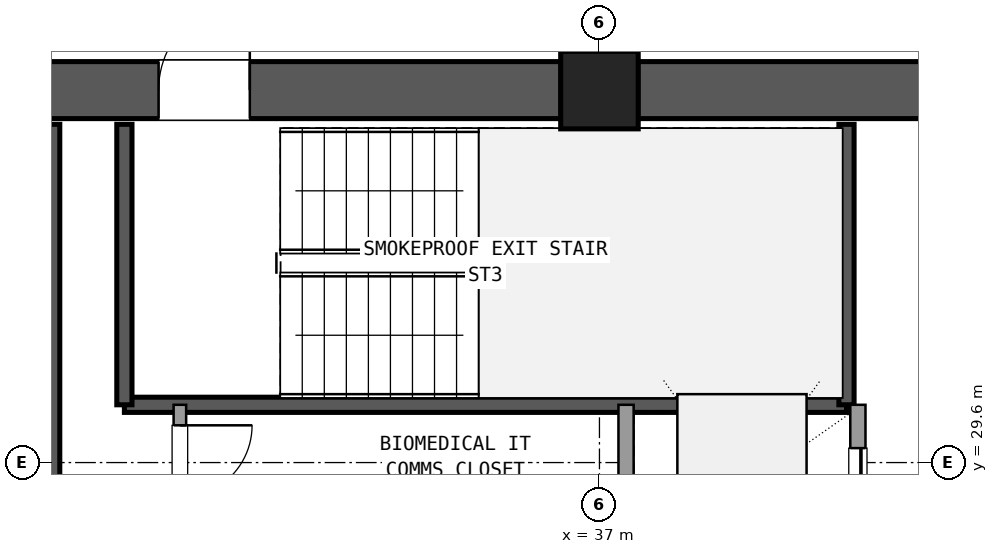
"""IFC4 building model, lengths in metres.
Left out: names, types, materials, properties, quantities, classifications, styles, units other than length and angle.
Written with IfcOpenShell. Run it as: python <this file> out.ifc"""

import sys

from ifc_helpers import new_model, si_unit, direction, frame, frame_2d, origin, origin_2d, place, context, subcontext, project, spatial, rectangle, extrude, element, fill, save


model = new_model("IFC4")
c1 = context("Model", 3, precision=1e-05, world=origin(), true_north=direction((0.0, 1.0)))
c2 = subcontext(c1, "Body", "Model", "MODEL_VIEW")
j1 = project(units=[si_unit("LENGTHUNIT", "METRE"), si_unit("PLANEANGLEUNIT", "RADIAN")], contexts=[c1])
p1 = place(None, origin())
s1 = spatial("IfcSite", under=j1, at=p1, CompositionType="ELEMENT")
p2 = place(p1, origin())
s2 = spatial("IfcBuilding", under=s1, at=p2, CompositionType="ELEMENT")
p3 = place(p2, frame((0.0, 0.0, 170.82)))
s3 = spatial("IfcBuildingStorey", under=s2, at=p3, CompositionType="ELEMENT", Elevation=170.82)
p4 = place(p3, frame((37.0, 34.5, 0.0), z_axis=(0.0, 0.0, 1.0), x_axis=(1.0, 0.0, 0.0)))
e1 = element("IfcColumn", 1, at=p4, inside=s3, PredefinedType="COLUMN", context=c2, shape_type="SweptSolid", body=[
    extrude(rectangle(XDim=1.02, YDim=1.02, at=origin_2d()), origin(), (0.0, 0.0, 1.0), 3.6),
])
p5 = place(p3, frame((47.695, 34.5, 0.0), z_axis=(0.0, 0.0, 1.0), x_axis=(-1.0, 0.0, 0.0)))
e2 = element("IfcWall", 2, at=p5, inside=s3, PredefinedType="SHEAR", context=c2, shape_type="SweptSolid", body=[
    extrude(rectangle(XDim=10.19, YDim=0.75, at=frame_2d((5.095, 0.0))), origin(), (0.0, 0.0, 1.0), 3.32),
])
p6 = place(p5, frame((4.595, 0.0, 0.0)))
e3 = element("IfcOpeningElement", 3, at=p6, cuts=e2, PredefinedType="OPENING", context=c2, shape_type="SweptSolid", body=[
    extrude(rectangle(XDim=1.6, YDim=2.2, at=frame_2d((0.8, 1.1))), frame((0.0, 0.385, 0.0), z_axis=(0.0, -1.0, 0.0), x_axis=(1.0, 0.0, 0.0)), (0.0, 0.0, 1.0), 0.77),
])
p7 = place(p3, frame((36.495, 34.5, 0.0), z_axis=(0.0, 0.0, 1.0), x_axis=(-1.0, 0.0, 0.0)))
e4 = element("IfcWall", 4, at=p7, inside=s3, PredefinedType="SHEAR", context=c2, shape_type="SweptSolid", body=[
    extrude(rectangle(XDim=10.19, YDim=0.75, at=frame_2d((5.095, 0.0))), origin(), (0.0, 0.0, 1.0), 3.32),
])
p8 = place(p7, frame((4.095, 0.0, 0.0)))
e5 = element("IfcOpeningElement", 5, at=p8, cuts=e4, PredefinedType="OPENING", context=c2, shape_type="SweptSolid", body=[
    extrude(rectangle(XDim=1.2, YDim=2.15, at=frame_2d((0.6, 1.075))), frame((0.0, 0.385, 0.0), z_axis=(0.0, -1.0, 0.0), x_axis=(1.0, 0.0, 0.0)), (0.0, 0.0, 1.0), 0.77),
])
p9 = place(p3, frame((29.8, 24.65, 0.0), z_axis=(0.0, 0.0, 1.0), x_axis=(0.0, 1.0, 0.0)))
e6 = element("IfcWall", 6, at=p9, inside=s3, PredefinedType="SHEAR", context=c2, shape_type="SweptSolid", body=[
    extrude(rectangle(XDim=9.4, YDim=0.2, at=frame_2d((4.7, 0.0))), origin(), (0.0, 0.0, 1.0), 3.32),
])
p10 = place(p3, frame((30.75, 30.36, 0.0), z_axis=(0.0, 0.0, 1.0), x_axis=(1.0, 0.0, 0.0)))
e7 = element("IfcWall", 7, at=p10, inside=s3, PredefinedType="SHEAR", context=c2, shape_type="SweptSolid", body=[
    extrude(rectangle(XDim=9.5, YDim=0.2, at=frame_2d((4.75, 0.0))), origin(), (0.0, 0.0, 1.0), 3.32),
])
for number, where, z_axis, x_axis in (
    (8, (30.75, 30.36, 0.0), (0.0, 0.0, 1.0), (0.0, 1.0, 0.0)),
    (9, (40.25, 30.36, 0.0), (0.0, 0.0, 1.0), (0.0, 1.0, 0.0)),
):
    element("IfcWall", number, at=place(p3, frame(where, z_axis=z_axis, x_axis=x_axis)), inside=s3, PredefinedType="SHEAR", context=c2, shape_type="SweptSolid", body=[
        extrude(rectangle(XDim=3.69, YDim=0.2, at=frame_2d((1.845, 0.0))), origin(), (0.0, 0.0, 1.0), 3.32),
    ])
p11 = place(p3, frame((37.35, 23.54, 0.0), z_axis=(0.0, 0.0, 1.0), x_axis=(0.0, 1.0, 0.0)))
e10 = element("IfcWall", 10, at=p11, inside=s3, PredefinedType="SOLIDWALL", context=c2, shape_type="SweptSolid", body=[
    extrude(rectangle(XDim=6.82, YDim=0.2, at=frame_2d((3.41, 0.0))), origin(), (0.0, 0.0, 1.0), 2.61),
])
p12 = place(p3, frame((40.4, 23.54, 0.0), z_axis=(0.0, 0.0, 1.0), x_axis=(0.0, 1.0, 0.0)))
e11 = element("IfcWall", 11, at=p12, inside=s3, PredefinedType="SOLIDWALL", context=c2, shape_type="SweptSolid", body=[
    extrude(rectangle(XDim=6.82, YDim=0.2, at=frame_2d((3.41, 0.0))), origin(), (0.0, 0.0, 1.0), 2.61),
])
p13 = place(p12, frame((0.35, 0.0, 0.0)))
e12 = element("IfcOpeningElement", 12, at=p13, cuts=e11, PredefinedType="OPENING", context=c2, shape_type="SweptSolid", body=[
    extrude(rectangle(XDim=1.4, YDim=2.2, at=frame_2d((0.7, 1.1))), frame((0.0, 0.11, 0.0), z_axis=(0.0, -1.0, 0.0), x_axis=(1.0, 0.0, 0.0)), (0.0, 0.0, 1.0), 0.22),
])
p14 = place(p12, frame((2.65, 0.0, 0.0)))
e13 = element("IfcOpeningElement", 13, at=p14, cuts=e11, PredefinedType="OPENING", context=c2, shape_type="SweptSolid", body=[
    extrude(rectangle(XDim=1.4, YDim=2.2, at=frame_2d((0.7, 1.1))), frame((0.0, 0.11, 0.0), z_axis=(0.0, -1.0, 0.0), x_axis=(1.0, 0.0, 0.0)), (0.0, 0.0, 1.0), 0.22),
])
p15 = place(p12, frame((4.85, 0.0, 0.0)))
e14 = element("IfcOpeningElement", 14, at=p15, cuts=e11, PredefinedType="OPENING", context=c2, shape_type="SweptSolid", body=[
    extrude(rectangle(XDim=1.4, YDim=2.2, at=frame_2d((0.7, 1.1))), frame((0.0, 0.11, 0.0), z_axis=(0.0, -1.0, 0.0), x_axis=(1.0, 0.0, 0.0)), (0.0, 0.0, 1.0), 0.22),
])
p16 = place(p3, frame((31.48, 26.32, 0.0), z_axis=(0.0, 0.0, 1.0), x_axis=(0.0, 1.0, 0.0)))
e15 = element("IfcWall", 15, at=p16, inside=s3, PredefinedType="PLUMBINGWALL", context=c2, shape_type="SweptSolid", body=[
    extrude(rectangle(XDim=4.04, YDim=0.165, at=frame_2d((2.02, 0.0))), origin(), (0.0, 0.0, 1.0), 2.61),
])
p17 = place(p16, frame((0.18, 0.0, 0.0)))
e16 = element("IfcOpeningElement", 16, at=p17, cuts=e15, PredefinedType="OPENING", context=c2, shape_type="SweptSolid", body=[
    extrude(rectangle(XDim=0.95, YDim=2.1, at=frame_2d((0.475, 1.05))), frame((0.0, 0.093, 0.0), z_axis=(0.0, -1.0, 0.0), x_axis=(1.0, 0.0, 0.0)), (0.0, 0.0, 1.0), 0.185),
])
p18 = place(p16, frame((1.5, 0.0, 0.0)))
e17 = element("IfcOpeningElement", 17, at=p18, cuts=e15, PredefinedType="OPENING", context=c2, shape_type="SweptSolid", body=[
    extrude(rectangle(XDim=0.95, YDim=2.1, at=frame_2d((0.475, 1.05))), frame((0.0, 0.093, 0.0), z_axis=(0.0, -1.0, 0.0), x_axis=(1.0, 0.0, 0.0)), (0.0, 0.0, 1.0), 0.185),
])
p19 = place(p16, frame((2.82, 0.0, 0.0)))
e18 = element("IfcOpeningElement", 18, at=p19, cuts=e15, PredefinedType="OPENING", context=c2, shape_type="SweptSolid", body=[
    extrude(rectangle(XDim=0.95, YDim=2.1, at=frame_2d((0.475, 1.05))), frame((0.0, 0.093, 0.0), z_axis=(0.0, -1.0, 0.0), x_axis=(1.0, 0.0, 0.0)), (0.0, 0.0, 1.0), 0.185),
])
p20 = place(p3, frame((37.0, 34.95, 0.0), z_axis=(0.0, 0.0, 1.0), x_axis=(0.0, 1.0, 0.0)))
e19 = element("IfcWall", 19, at=p20, inside=s3, PredefinedType="PARTITIONING", context=c2, shape_type="SweptSolid", body=[
    extrude(rectangle(XDim=3.21, YDim=0.18, at=frame_2d((1.605, 0.0))), origin(), (0.0, 0.0, 1.0), 2.61),
])
p21 = place(p20, frame((0.605, 0.0, 0.0)))
e20 = element("IfcOpeningElement", 20, at=p21, cuts=e19, PredefinedType="OPENING", context=c2, shape_type="SweptSolid", body=[
    extrude(rectangle(XDim=2.0, YDim=2.2, at=frame_2d((1.0, 1.1))), frame((0.0, 0.1, 0.0), z_axis=(0.0, -1.0, 0.0), x_axis=(1.0, 0.0, 0.0)), (0.0, 0.0, 1.0), 0.2),
])
p22 = place(p8, frame((1.2, 0.0, 0.0), z_axis=(0.0, 0.0, 1.0), x_axis=(-1.0, 0.0, 0.0)))
e21 = element("IfcDoor", 21, at=p22, inside=s3, OperationType="SINGLE_SWING_LEFT", PredefinedType="DOOR", context=c2, shape_type="SweptSolid", body=[
    extrude(rectangle(XDim=1.2, YDim=2.15, at=frame_2d((0.6, 1.075))), frame((0.0, 0.025, 0.0), z_axis=(0.0, -1.0, 0.0), x_axis=(1.0, 0.0, 0.0)), (0.0, 0.0, 1.0), 0.05),
])
fill(e5, e21)
p23 = place(p15, origin())
e22 = element("IfcDoor", 22, at=p23, inside=s3, OperationType="SLIDING_TO_RIGHT", PredefinedType="DOOR", context=c2, shape_type="SweptSolid", body=[
    extrude(rectangle(XDim=1.4, YDim=2.2, at=frame_2d((0.7, 1.1))), frame((0.0, 0.025, 0.0), z_axis=(0.0, -1.0, 0.0), x_axis=(1.0, 0.0, 0.0)), (0.0, 0.0, 1.0), 0.05),
])
fill(e14, e22)
p24 = place(p19, frame((0.95, 0.0, 0.0), z_axis=(0.0, 0.0, 1.0), x_axis=(-1.0, 0.0, 0.0)))
e23 = element("IfcDoor", 23, at=p24, inside=s3, OperationType="SINGLE_SWING_RIGHT", PredefinedType="DOOR", context=c2, shape_type="SweptSolid", body=[
    extrude(rectangle(XDim=0.95, YDim=2.1, at=frame_2d((0.475, 1.05))), frame((0.0, 0.025, 0.0), z_axis=(0.0, -1.0, 0.0), x_axis=(1.0, 0.0, 0.0)), (0.0, 0.0, 1.0), 0.05),
])
fill(e18, e23)
save(model, sys.argv[1])
